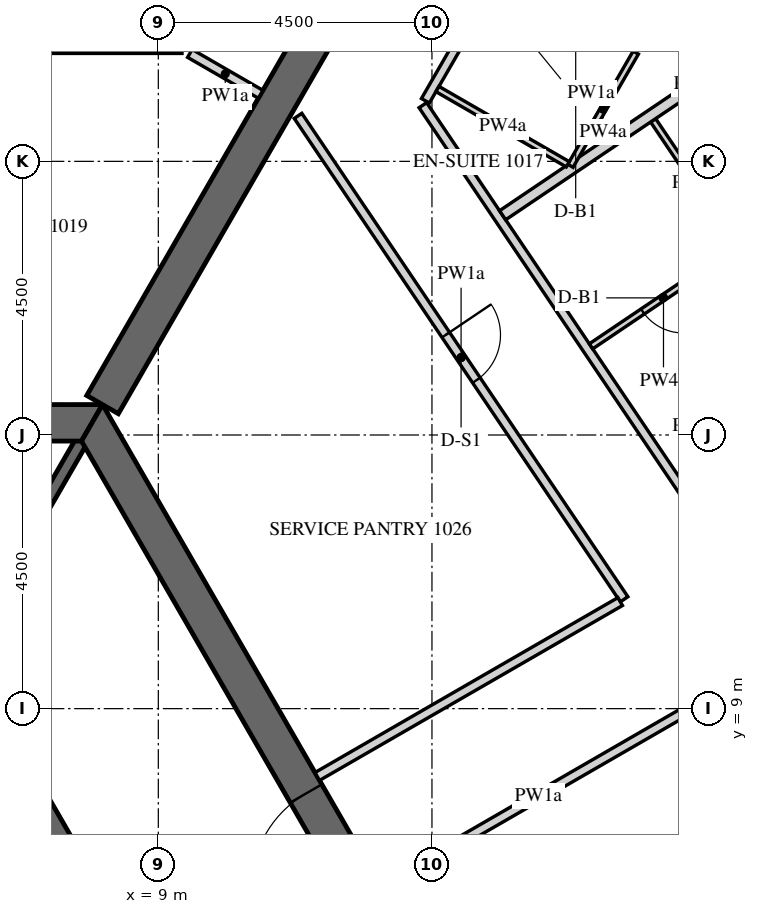
"""IFC4 building model, lengths in metres.
Left out: names, types, materials, properties, quantities, classifications, styles, units other than length and angle.
Written with IfcOpenShell. Run it as: python <this file> out.ifc"""

import sys

from ifc_helpers import new_model, si_unit, direction, frame, frame_2d, origin, place, context, subcontext, project, spatial, polyline, rectangle, outline, extrude, element, fill, save


model = new_model("IFC4")
c1 = context("Model", 3, precision=1e-05, world=origin(), true_north=direction((0.0, 1.0)))
c2 = subcontext(c1, "Body", "Model", "MODEL_VIEW")
j1 = project(units=[si_unit("LENGTHUNIT", "METRE"), si_unit("PLANEANGLEUNIT", "RADIAN")], contexts=[c1])
p1 = place(None, origin())
s1 = spatial("IfcSite", under=j1, at=p1, CompositionType="ELEMENT")
p2 = place(p1, origin())
s2 = spatial("IfcBuilding", under=s1, at=p2, CompositionType="ELEMENT")
p3 = place(p2, frame((0.0, 0.0, 142.8)))
s3 = spatial("IfcBuildingStorey", under=s2, at=p3, CompositionType="ELEMENT", Elevation=142.8)
p4 = place(p3, frame((33.728, 3.153, -0.15), z_axis=(0.0, 0.0, 1.0), x_axis=(-0.559192411416, 0.82903790445, 0.0)))
e1 = element("IfcWall", 1, at=p4, inside=s3, PredefinedType="SOLIDWALL", context=c2, shape_type="SweptSolid", body=[
    extrude(outline(polyline([(-0.026, -0.275), (30.093, -0.275), (30.048, 0.275), (0.026, 0.275), (-0.026, -0.275)])), origin(), (0.0, 0.0, 1.0), 3.75),
])
p5 = place(p4, frame((1.236, 0.0, 1.05)))
e2 = element("IfcOpeningElement", 2, at=p5, cuts=e1, PredefinedType="OPENING", context=c2, shape_type="SweptSolid", body=[
    extrude(rectangle(XDim=2.4, YDim=2.4, at=frame_2d((1.2, 1.2))), frame((0.0, 0.285, 0.0), z_axis=(0.0, -1.0, 0.0), x_axis=(1.0, 0.0, 0.0)), (0.0, 0.0, 1.0), 0.57),
])
p6 = place(p4, frame((4.835, 0.0, 1.05)))
e3 = element("IfcOpeningElement", 3, at=p6, cuts=e1, PredefinedType="OPENING", context=c2, shape_type="SweptSolid", body=[
    extrude(rectangle(XDim=2.4, YDim=2.4, at=frame_2d((1.2, 1.2))), frame((0.0, 0.285, 0.0), z_axis=(0.0, -1.0, 0.0), x_axis=(1.0, 0.0, 0.0)), (0.0, 0.0, 1.0), 0.57),
])
p7 = place(p4, frame((8.436, 0.0, 1.05)))
e4 = element("IfcOpeningElement", 4, at=p7, cuts=e1, PredefinedType="OPENING", context=c2, shape_type="SweptSolid", body=[
    extrude(rectangle(XDim=2.4, YDim=2.4, at=frame_2d((1.2, 1.2))), frame((0.0, 0.285, 0.0), z_axis=(0.0, -1.0, 0.0), x_axis=(1.0, 0.0, 0.0)), (0.0, 0.0, 1.0), 0.57),
])
p8 = place(p4, frame((12.035, 0.0, 1.05)))
e5 = element("IfcOpeningElement", 5, at=p8, cuts=e1, PredefinedType="OPENING", context=c2, shape_type="SweptSolid", body=[
    extrude(rectangle(XDim=2.4, YDim=2.4, at=frame_2d((1.2, 1.2))), frame((0.0, 0.285, 0.0), z_axis=(0.0, -1.0, 0.0), x_axis=(1.0, 0.0, 0.0)), (0.0, 0.0, 1.0), 0.57),
])
p9 = place(p4, frame((15.635, 0.0, 1.05)))
e6 = element("IfcOpeningElement", 6, at=p9, cuts=e1, PredefinedType="OPENING", context=c2, shape_type="SweptSolid", body=[
    extrude(rectangle(XDim=2.4, YDim=2.4, at=frame_2d((1.2, 1.2))), frame((0.0, 0.285, 0.0), z_axis=(0.0, -1.0, 0.0), x_axis=(1.0, 0.0, 0.0)), (0.0, 0.0, 1.0), 0.57),
])
p10 = place(p4, frame((19.236, 0.0, 1.05)))
e7 = element("IfcOpeningElement", 7, at=p10, cuts=e1, PredefinedType="OPENING", context=c2, shape_type="SweptSolid", body=[
    extrude(rectangle(XDim=2.4, YDim=2.4, at=frame_2d((1.2, 1.2))), frame((0.0, 0.285, 0.0), z_axis=(0.0, -1.0, 0.0), x_axis=(1.0, 0.0, 0.0)), (0.0, 0.0, 1.0), 0.57),
])
p11 = place(p4, frame((22.835, 0.0, 1.05)))
e8 = element("IfcOpeningElement", 8, at=p11, cuts=e1, PredefinedType="OPENING", context=c2, shape_type="SweptSolid", body=[
    extrude(rectangle(XDim=2.4, YDim=2.4, at=frame_2d((1.2, 1.2))), frame((0.0, 0.285, 0.0), z_axis=(0.0, -1.0, 0.0), x_axis=(1.0, 0.0, 0.0)), (0.0, 0.0, 1.0), 0.57),
])
p12 = place(p4, frame((26.436, 0.0, 1.05)))
e9 = element("IfcOpeningElement", 9, at=p12, cuts=e1, PredefinedType="OPENING", context=c2, shape_type="SweptSolid", body=[
    extrude(rectangle(XDim=2.4, YDim=2.4, at=frame_2d((1.2, 1.2))), frame((0.0, 0.285, 0.0), z_axis=(0.0, -1.0, 0.0), x_axis=(1.0, 0.0, 0.0)), (0.0, 0.0, 1.0), 0.57),
])
p13 = place(p3, frame((15.819, 0.0, -0.15), z_axis=(0.0, 0.0, 1.0), x_axis=(-0.499999880136, 0.866025472988, 0.0)))
e10 = element("IfcWall", 10, at=p13, inside=s3, PredefinedType="SHEAR", context=c2, shape_type="SweptSolid", body=[
    extrude(outline(polyline([(-0.173, -0.3), (15.993, -0.3), (15.646, 0.3), (0.173, 0.3), (-0.173, -0.3)])), origin(), (0.0, 0.0, 1.0), 3.75),
])
p14 = place(p13, frame((6.981, 0.0, 0.15)))
e11 = element("IfcOpeningElement", 11, at=p14, cuts=e10, PredefinedType="OPENING", context=c2, shape_type="SweptSolid", body=[
    extrude(rectangle(XDim=1.8, YDim=2.4, at=frame_2d((0.9, 1.2))), frame((0.0, 0.31, 0.0), z_axis=(0.0, -1.0, 0.0), x_axis=(1.0, 0.0, 0.0)), (0.0, 0.0, 1.0), 0.62),
])
p15 = place(p3, frame((7.91, 13.7, -0.15), z_axis=(0.0, 0.0, 1.0), x_axis=(-1.0, 0.0, 0.0)))
e12 = element("IfcWall", 12, at=p15, inside=s3, PredefinedType="SHEAR", context=c2, shape_type="SweptSolid", body=[
    extrude(outline(polyline([(-0.173, -0.3), (15.993, -0.3), (15.646, 0.3), (0.173, 0.3), (-0.173, -0.3)])), origin(), (0.0, 0.0, 1.0), 3.75),
])
p16 = place(p15, frame((7.31, 0.0, 0.15)))
e13 = element("IfcOpeningElement", 13, at=p16, cuts=e12, PredefinedType="OPENING", context=c2, shape_type="SweptSolid", body=[
    extrude(rectangle(XDim=1.2, YDim=2.4, at=frame_2d((0.6, 1.2))), frame((0.0, 0.31, 0.0), z_axis=(0.0, -1.0, 0.0), x_axis=(1.0, 0.0, 0.0)), (0.0, 0.0, 1.0), 0.62),
])
p17 = place(p3, frame((8.083, 14.0, -0.15), z_axis=(0.0, 0.0, 1.0), x_axis=(0.499997680643, 0.866026742862, 0.0)))
e14 = element("IfcWall", 14, at=p17, inside=s3, PredefinedType="SHEAR", context=c2, shape_type="SweptSolid", body=[
    extrude(rectangle(XDim=16.509, YDim=0.6, at=frame_2d((8.254, 0.0))), origin(), (0.0, 0.0, 1.0), 3.75),
])
p18 = place(p17, frame((7.354, 0.0, 0.15)))
e15 = element("IfcOpeningElement", 15, at=p18, cuts=e14, PredefinedType="OPENING", context=c2, shape_type="SweptSolid", body=[
    extrude(rectangle(XDim=1.8, YDim=2.4, at=frame_2d((0.9, 1.2))), frame((0.0, 0.31, 0.0), z_axis=(0.0, -1.0, 0.0), x_axis=(1.0, 0.0, 0.0)), (0.0, 0.0, 1.0), 0.62),
])
p19 = place(p3, frame((11.345, 0.0, -0.15), z_axis=(0.0, 0.0, 1.0), x_axis=(-0.499995046907, 0.866028263435, 0.0)))
e16 = element("IfcWall", 16, at=p19, inside=s3, PredefinedType="SHEAR", context=c2, shape_type="SweptSolid", body=[
    extrude(outline(polyline([(-0.101, -0.175), (11.446, -0.175), (11.244, 0.175), (0.101, 0.175), (-0.101, -0.175)])), origin(), (0.0, 0.0, 1.0), 3.75),
])
p20 = place(p19, frame((4.744, 0.0, 0.15)))
e17 = element("IfcOpeningElement", 17, at=p20, cuts=e16, PredefinedType="OPENING", context=c2, shape_type="SweptSolid", body=[
    extrude(rectangle(XDim=1.8, YDim=2.4, at=frame_2d((0.9, 1.2))), frame((0.0, 0.185, 0.0), z_axis=(0.0, -1.0, 0.0), x_axis=(1.0, 0.0, 0.0)), (0.0, 0.0, 1.0), 0.37),
])
p21 = place(p3, frame((5.773, 10.0, -0.15), z_axis=(0.0, 0.0, 1.0), x_axis=(0.500038251005, 0.86600331843, 0.0)))
e18 = element("IfcWall", 18, at=p21, inside=s3, PredefinedType="SHEAR", context=c2, shape_type="SweptSolid", body=[
    extrude(rectangle(XDim=3.926, YDim=0.2, at=frame_2d((1.963, 0.0))), origin(), (0.0, 0.0, 1.0), 3.75),
])
p22 = place(p3, frame((0.825, 19.85, 0.0), z_axis=(0.0, 0.0, 1.0), x_axis=(1.0, 0.0, 0.0)))
e19 = element("IfcWall", 19, at=p22, inside=s3, PredefinedType="PARTITIONING", context=c2, shape_type="SweptSolid", body=[
    extrude(rectangle(XDim=8.564, YDim=0.15, at=frame_2d((4.282, 0.0))), origin(), (0.0, 0.0, 1.0), 2.838),
])
p23 = place(p22, frame((3.832, 0.0, 0.0)))
e20 = element("IfcOpeningElement", 20, at=p23, cuts=e19, PredefinedType="OPENING", context=c2, shape_type="SweptSolid", body=[
    extrude(rectangle(XDim=0.9, YDim=2.1, at=frame_2d((0.45, 1.05))), frame((0.0, 0.085, 0.0), z_axis=(0.0, -1.0, 0.0), x_axis=(1.0, 0.0, 0.0)), (0.0, 0.0, 1.0), 0.17),
])
p24 = place(p3, frame((9.519, 19.775, 0.0), z_axis=(0.0, 0.0, 1.0), x_axis=(0.866043397086, -0.499968833392, 0.0)))
e21 = element("IfcWall", 21, at=p24, inside=s3, PredefinedType="PARTITIONING", context=c2, shape_type="SweptSolid", body=[
    extrude(rectangle(XDim=1.344, YDim=0.15, at=frame_2d((0.672, 0.0))), origin(), (0.0, 0.0, 1.0), 2.838),
])
p25 = place(p3, frame((25.467, 0.96, 0.0), z_axis=(0.0, 0.0, 1.0), x_axis=(-0.559200743185, 0.829032284547, 0.0)))
e22 = element("IfcWall", 22, at=p25, inside=s3, PredefinedType="PARTITIONING", context=c2, shape_type="SweptSolid", body=[
    extrude(rectangle(XDim=21.668, YDim=0.15, at=frame_2d((10.834, 0.0))), origin(), (0.0, 0.0, 1.0), 2.838),
])
p26 = place(p25, frame((10.434, 0.0, 0.0)))
e23 = element("IfcOpeningElement", 23, at=p26, cuts=e22, PredefinedType="OPENING", context=c2, shape_type="SweptSolid", body=[
    extrude(rectangle(XDim=1.0, YDim=2.1, at=frame_2d((0.5, 1.05))), frame((0.0, 0.085, 0.0), z_axis=(0.0, -1.0, 0.0), x_axis=(1.0, 0.0, 0.0)), (0.0, 0.0, 1.0), 0.17),
])
p27 = place(p3, frame((13.392, 18.996, 0.0), z_axis=(0.0, 0.0, 1.0), x_axis=(0.499995902753, 0.866027769318, 0.0)))
e24 = element("IfcWall", 24, at=p27, inside=s3, PredefinedType="PARTITIONING", context=c2, shape_type="SweptSolid", body=[
    extrude(rectangle(XDim=4.173, YDim=0.15, at=frame_2d((2.087, 0.0))), origin(), (0.0, 0.0, 1.0), 2.838),
])
p28 = place(p27, frame((2.645, 0.0, 0.0)))
e25 = element("IfcOpeningElement", 25, at=p28, cuts=e24, PredefinedType="OPENING", context=c2, shape_type="SweptSolid", body=[
    extrude(rectangle(XDim=1.0, YDim=2.1, at=frame_2d((0.5, 1.05))), frame((0.0, 0.085, 0.0), z_axis=(0.0, -1.0, 0.0), x_axis=(1.0, 0.0, 0.0)), (0.0, 0.0, 1.0), 0.17),
])
p29 = place(p3, frame((12.664, 6.066, 0.0), z_axis=(0.0, 0.0, 1.0), x_axis=(0.866018848283, 0.500011354289, 0.0)))
e26 = element("IfcWall", 26, at=p29, inside=s3, PredefinedType="PARTITIONING", context=c2, shape_type="SweptSolid", body=[
    extrude(rectangle(XDim=5.974, YDim=0.15, at=frame_2d((2.987, 0.0))), origin(), (0.0, 0.0, 1.0), 2.838),
])
p30 = place(p3, frame((11.298, 18.748, 0.0), z_axis=(0.0, 0.0, 1.0), x_axis=(0.559198234291, -0.829033976847, 0.0)))
e27 = element("IfcWall", 27, at=p30, inside=s3, PredefinedType="PARTITIONING", context=c2, shape_type="SweptSolid", body=[
    extrude(rectangle(XDim=9.59, YDim=0.15, at=frame_2d((4.795, 0.0))), origin(), (0.0, 0.0, 1.0), 2.838),
])
p31 = place(p30, frame((4.345, 0.0, 0.0)))
e28 = element("IfcOpeningElement", 28, at=p31, cuts=e27, PredefinedType="OPENING", context=c2, shape_type="SweptSolid", body=[
    extrude(rectangle(XDim=0.9, YDim=2.1, at=frame_2d((0.45, 1.05))), frame((0.0, 0.085, 0.0), z_axis=(0.0, -1.0, 0.0), x_axis=(1.0, 0.0, 0.0)), (0.0, 0.0, 1.0), 0.17),
])
p32 = place(p3, frame((16.595, 10.76, 0.0), z_axis=(0.0, 0.0, 1.0), x_axis=(-0.866019477104, -0.500010265171, 0.0)))
e29 = element("IfcWall", 29, at=p32, inside=s3, PredefinedType="PARTITIONING", context=c2, shape_type="SweptSolid", body=[
    extrude(rectangle(XDim=5.752, YDim=0.15, at=frame_2d((2.876, 0.0))), origin(), (0.0, 0.0, 1.0), 2.838),
])
p33 = place(p3, frame((17.137, 18.675, 0.0), z_axis=(0.0, 0.0, 1.0), x_axis=(0.559203861497, -0.829030181168, 0.0)))
e30 = element("IfcWall", 30, at=p33, inside=s3, PredefinedType="PARTITIONING", context=c2, shape_type="SweptSolid", body=[
    extrude(rectangle(XDim=2.51, YDim=0.1, at=frame_2d((1.255, 0.0))), origin(), (0.0, 0.0, 1.0), 2.838),
])
p34 = place(p3, frame((18.499, 16.566, 0.0), z_axis=(0.0, 0.0, 1.0), x_axis=(-0.82904649496, -0.559179675234, 0.0)))
e31 = element("IfcWall", 31, at=p34, inside=s3, PredefinedType="PARTITIONING", context=c2, shape_type="SweptSolid", body=[
    extrude(rectangle(XDim=2.875, YDim=0.1, at=frame_2d((1.438, 0.0))), origin(), (0.0, 0.0, 1.0), 2.838),
])
p35 = place(p34, frame((1.05, 0.0, 0.0)))
e32 = element("IfcOpeningElement", 32, at=p35, cuts=e31, PredefinedType="OPENING", context=c2, shape_type="SweptSolid", body=[
    extrude(rectangle(XDim=0.8, YDim=2.1, at=frame_2d((0.4, 1.05))), frame((0.0, 0.06, 0.0), z_axis=(0.0, -1.0, 0.0), x_axis=(1.0, 0.0, 0.0)), (0.0, 0.0, 1.0), 0.12),
])
p36 = place(p3, frame((21.066, 21.433, 0.0), z_axis=(0.0, 0.0, 1.0), x_axis=(-0.82903328576, -0.559199258853, 0.0)))
e33 = element("IfcWall", 33, at=p36, inside=s3, PredefinedType="PARTITIONING", context=c2, shape_type="SweptSolid", body=[
    extrude(rectangle(XDim=7.725, YDim=0.18, at=frame_2d((3.863, 0.0))), origin(), (0.0, 0.0, 1.0), 2.838),
])
p37 = place(p3, frame((14.69, 21.094, 0.0), z_axis=(0.0, 0.0, 1.0), x_axis=(0.866039067339, -0.499976333282, 0.0)))
e34 = element("IfcWall", 34, at=p37, inside=s3, PredefinedType="PARTITIONING", context=c2, shape_type="SweptSolid", body=[
    extrude(rectangle(XDim=2.525, YDim=0.1, at=frame_2d((1.262, 0.0))), origin(), (0.0, 0.0, 1.0), 2.838),
])
p38 = place(p37, frame((0.955, 0.0, 0.0)))
e35 = element("IfcOpeningElement", 35, at=p38, cuts=e34, PredefinedType="OPENING", context=c2, shape_type="SweptSolid", body=[
    extrude(rectangle(XDim=0.8, YDim=2.1, at=frame_2d((0.4, 1.05))), frame((0.0, 0.06, 0.0), z_axis=(0.0, -1.0, 0.0), x_axis=(1.0, 0.0, 0.0)), (0.0, 0.0, 1.0), 0.12),
])
p39 = place(p3, frame((16.852, 19.789, 0.0), z_axis=(0.0, 0.0, 1.0), x_axis=(-0.499961633463, -0.866047553582, 0.0)))
e36 = element("IfcWall", 36, at=p39, inside=s3, PredefinedType="PARTITIONING", context=c2, shape_type="SweptSolid", body=[
    extrude(rectangle(XDim=2.15, YDim=0.1, at=frame_2d((1.075, 0.0))), origin(), (0.0, 0.0, 1.0), 2.838),
])
p40 = place(p3, frame((15.734, 17.952, 0.0), z_axis=(0.0, 0.0, 1.0), x_axis=(-0.866031185235, 0.4999899861, 0.0)))
e37 = element("IfcWall", 37, at=p40, inside=s3, PredefinedType="PARTITIONING", context=c2, shape_type="SweptSolid", body=[
    extrude(rectangle(XDim=2.475, YDim=0.1, at=frame_2d((1.238, 0.0))), origin(), (0.0, 0.0, 1.0), 2.838),
])
p41 = place(p14, origin())
e38 = element("IfcDoor", 38, at=p41, inside=s3, OperationType="DOUBLE_DOOR_SINGLE_SWING", PredefinedType="DOOR", context=c2, shape_type="SweptSolid", body=[
    extrude(rectangle(XDim=1.8, YDim=2.4, at=frame_2d((0.9, 1.2))), frame((0.0, 0.025, 0.0), z_axis=(0.0, -1.0, 0.0), x_axis=(1.0, 0.0, 0.0)), (0.0, 0.0, 1.0), 0.05),
])
fill(e11, e38)
p42 = place(p35, origin())
e39 = element("IfcDoor", 39, at=p42, inside=s3, OperationType="SINGLE_SWING_LEFT", PredefinedType="DOOR", context=c2, shape_type="SweptSolid", body=[
    extrude(rectangle(XDim=0.8, YDim=2.1, at=frame_2d((0.4, 1.05))), frame((0.0, 0.025, 0.0), z_axis=(0.0, -1.0, 0.0), x_axis=(1.0, 0.0, 0.0)), (0.0, 0.0, 1.0), 0.05),
])
fill(e32, e39)
p43 = place(p31, origin())
e40 = element("IfcDoor", 40, at=p43, inside=s3, OperationType="SINGLE_SWING_RIGHT", PredefinedType="DOOR", context=c2, shape_type="SweptSolid", body=[
    extrude(rectangle(XDim=0.9, YDim=2.1, at=frame_2d((0.45, 1.05))), frame((0.0, 0.025, 0.0), z_axis=(0.0, -1.0, 0.0), x_axis=(1.0, 0.0, 0.0)), (0.0, 0.0, 1.0), 0.05),
])
fill(e28, e40)
save(model, sys.argv[1])
